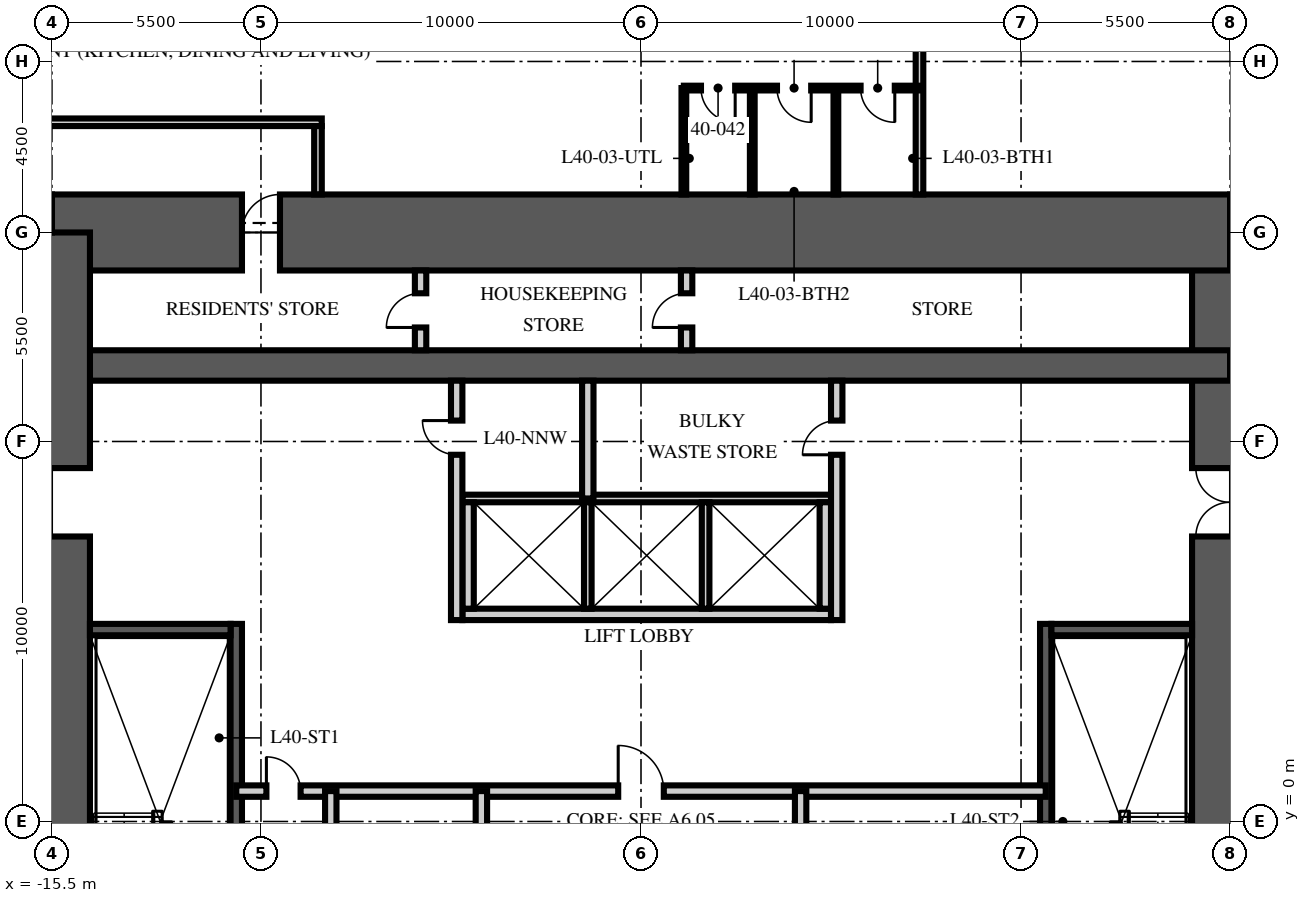
"""IFC4 building model, lengths in metres.
Left out: names, types, materials, properties, quantities, classifications, styles, units other than length and angle.
Written with IfcOpenShell. Run it as: python <this file> out.ifc"""

import sys

from ifc_helpers import new_model, si_unit, direction, frame, frame_2d, origin, place, context, subcontext, project, spatial, rectangle, extrude, element, fill, save


model = new_model("IFC4")
c1 = context("Model", 3, precision=1e-05, world=origin(), true_north=direction((0.0, 1.0)))
c2 = subcontext(c1, "Body", "Model", "MODEL_VIEW")
j1 = project(units=[si_unit("LENGTHUNIT", "METRE"), si_unit("PLANEANGLEUNIT", "RADIAN")], contexts=[c1])
p1 = place(None, origin())
s1 = spatial("IfcSite", under=j1, at=p1, CompositionType="ELEMENT")
p2 = place(p1, origin())
s2 = spatial("IfcBuilding", under=s1, at=p2, CompositionType="ELEMENT")
p3 = place(p2, frame((0.0, 0.0, 159.75)))
s3 = spatial("IfcBuildingStorey", under=s2, at=p3, CompositionType="ELEMENT", Elevation=159.75)
p4 = place(p3, frame((15.5, -15.5, -0.25), z_axis=(0.0, 0.0, 1.0), x_axis=(0.0, 1.0, 0.0)))
e1 = element("IfcWall", 1, at=p4, inside=s3, PredefinedType="SHEAR", context=c2, shape_type="SweptSolid", body=[
    extrude(rectangle(XDim=31.0, YDim=2.0, at=frame_2d((15.5, 0.0))), origin(), (0.0, 0.0, 1.0), 3.75),
])
p5 = place(p4, frame((6.5, 0.0, 0.25)))
e2 = element("IfcOpeningElement", 2, at=p5, cuts=e1, PredefinedType="OPENING", context=c2, shape_type="SweptSolid", body=[
    extrude(rectangle(XDim=1.2, YDim=2.1, at=frame_2d((0.6, 1.05))), frame((0.0, 1.01, 0.0), z_axis=(0.0, -1.0, 0.0), x_axis=(1.0, 0.0, 0.0)), (0.0, 0.0, 1.0), 2.02),
])
p6 = place(p4, frame((23.0, 0.0, 0.25)))
e3 = element("IfcOpeningElement", 3, at=p6, cuts=e1, PredefinedType="OPENING", context=c2, shape_type="SweptSolid", body=[
    extrude(rectangle(XDim=1.8, YDim=2.1, at=frame_2d((0.9, 1.05))), frame((0.0, 1.01, 0.0), z_axis=(0.0, -1.0, 0.0), x_axis=(1.0, 0.0, 0.0)), (0.0, 0.0, 1.0), 2.02),
])
p7 = place(p3, frame((-15.5, 15.5, -0.25), z_axis=(0.0, 0.0, 1.0), x_axis=(1.0, 0.0, 0.0)))
e4 = element("IfcWall", 4, at=p7, inside=s3, PredefinedType="SHEAR", context=c2, shape_type="SweptSolid", body=[
    extrude(rectangle(XDim=31.0, YDim=2.0, at=frame_2d((15.5, 0.0))), origin(), (0.0, 0.0, 1.0), 3.75),
])
p8 = place(p7, frame((5.0, 0.0, 0.25)))
e5 = element("IfcOpeningElement", 5, at=p8, cuts=e4, PredefinedType="OPENING", context=c2, shape_type="SweptSolid", body=[
    extrude(rectangle(XDim=1.0, YDim=2.1, at=frame_2d((0.5, 1.05))), frame((0.0, 1.01, 0.0), z_axis=(0.0, -1.0, 0.0), x_axis=(1.0, 0.0, 0.0)), (0.0, 0.0, 1.0), 2.02),
])
p9 = place(p3, frame((-15.5, 12.0, -0.25), z_axis=(0.0, 0.0, 1.0), x_axis=(1.0, 0.0, 0.0)))
e6 = element("IfcWall", 6, at=p9, inside=s3, PredefinedType="SHEAR", context=c2, shape_type="SweptSolid", body=[
    extrude(rectangle(XDim=31.0, YDim=0.8, at=frame_2d((15.5, 0.0))), origin(), (0.0, 0.0, 1.0), 3.75),
])
p10 = place(p3, frame((-15.5, -15.5, -0.25), z_axis=(0.0, 0.0, 1.0), x_axis=(0.0, 1.0, 0.0)))
e7 = element("IfcWall", 7, at=p10, inside=s3, PredefinedType="SHEAR", context=c2, shape_type="SweptSolid", body=[
    extrude(rectangle(XDim=31.0, YDim=2.0, at=frame_2d((15.5, 0.0))), origin(), (0.0, 0.0, 1.0), 3.75),
])
p11 = place(p10, frame((6.5, 0.0, 0.25)))
e8 = element("IfcOpeningElement", 8, at=p11, cuts=e7, PredefinedType="OPENING", context=c2, shape_type="SweptSolid", body=[
    extrude(rectangle(XDim=1.2, YDim=2.1, at=frame_2d((0.6, 1.05))), frame((0.0, 1.01, 0.0), z_axis=(0.0, -1.0, 0.0), x_axis=(1.0, 0.0, 0.0)), (0.0, 0.0, 1.0), 2.02),
])
p12 = place(p10, frame((23.0, 0.0, 0.25)))
e9 = element("IfcOpeningElement", 9, at=p12, cuts=e7, PredefinedType="OPENING", context=c2, shape_type="SweptSolid", body=[
    extrude(rectangle(XDim=1.8, YDim=2.1, at=frame_2d((0.9, 1.05))), frame((0.0, 1.01, 0.0), z_axis=(0.0, -1.0, 0.0), x_axis=(1.0, 0.0, 0.0)), (0.0, 0.0, 1.0), 2.02),
])
p13 = place(p3, frame((-10.65, -4.9, 0.0), z_axis=(0.0, 0.0, 1.0), x_axis=(0.0, 1.0, 0.0)))
e10 = element("IfcWall", 10, at=p13, inside=s3, PredefinedType="SOLIDWALL", context=c2, shape_type="SweptSolid", body=[
    extrude(rectangle(XDim=10.1, YDim=0.3, at=frame_2d((5.05, 0.0))), origin(), (0.0, 0.0, 1.0), 3.5),
])
p14 = place(p3, frame((-14.5, 5.05, 0.0), z_axis=(0.0, 0.0, 1.0), x_axis=(1.0, 0.0, 0.0)))
e11 = element("IfcWall", 11, at=p14, inside=s3, PredefinedType="SOLIDWALL", context=c2, shape_type="SweptSolid", body=[
    extrude(rectangle(XDim=3.7, YDim=0.3, at=frame_2d((1.85, 0.0))), origin(), (0.0, 0.0, 1.0), 3.5),
])
p15 = place(p3, frame((10.65, -4.9, 0.0), z_axis=(0.0, 0.0, 1.0), x_axis=(0.0, 1.0, 0.0)))
e12 = element("IfcWall", 12, at=p15, inside=s3, PredefinedType="SOLIDWALL", context=c2, shape_type="SweptSolid", body=[
    extrude(rectangle(XDim=10.1, YDim=0.3, at=frame_2d((5.05, 0.0))), origin(), (0.0, 0.0, 1.0), 3.5),
])
p16 = place(p3, frame((14.5, 5.05, 0.0), z_axis=(0.0, 0.0, 1.0), x_axis=(-1.0, 0.0, 0.0)))
e13 = element("IfcWall", 13, at=p16, inside=s3, PredefinedType="SOLIDWALL", context=c2, shape_type="SweptSolid", body=[
    extrude(rectangle(XDim=3.7, YDim=0.3, at=frame_2d((1.85, 0.0))), origin(), (0.0, 0.0, 1.0), 3.5),
])
p17 = place(p3, frame((-4.7, 5.45, 0.0), z_axis=(0.0, 0.0, 1.0), x_axis=(1.0, 0.0, 0.0)))
e14 = element("IfcWall", 14, at=p17, inside=s3, PredefinedType="PARTITIONING", context=c2, shape_type="SweptSolid", body=[
    extrude(rectangle(XDim=9.7, YDim=0.3, at=frame_2d((4.85, 0.0))), origin(), (0.0, 0.0, 1.0), 3.5),
])
p18 = place(p3, frame((-4.7, 8.5, 0.0), z_axis=(0.0, 0.0, 1.0), x_axis=(1.0, 0.0, 0.0)))
e15 = element("IfcWall", 15, at=p18, inside=s3, PredefinedType="PARTITIONING", context=c2, shape_type="SweptSolid", body=[
    extrude(rectangle(XDim=9.7, YDim=0.2, at=frame_2d((4.85, 0.0))), origin(), (0.0, 0.0, 1.0), 3.5),
])
for number, where, z_axis, x_axis in (
    (16, (-4.55, 5.6, 0.0), (0.0, 0.0, 1.0), (0.0, 1.0, 0.0)),
    (17, (4.85, 5.6, 0.0), (0.0, 0.0, 1.0), (0.0, 1.0, 0.0)),
):
    element("IfcWall", number, at=place(p3, frame(where, z_axis=z_axis, x_axis=x_axis)), inside=s3, PredefinedType="PARTITIONING", context=c2, shape_type="SweptSolid", body=[
        extrude(rectangle(XDim=2.8, YDim=0.3, at=frame_2d((1.4, 0.0))), origin(), (0.0, 0.0, 1.0), 3.5),
    ])
for number, where, z_axis, x_axis in (
    (18, (-1.4, 5.6, 0.0), (0.0, 0.0, 1.0), (0.0, 1.0, 0.0)),
    (19, (1.7, 5.6, 0.0), (0.0, 0.0, 1.0), (0.0, 1.0, 0.0)),
):
    element("IfcWall", number, at=place(p3, frame(where, z_axis=z_axis, x_axis=x_axis)), inside=s3, PredefinedType="PARTITIONING", context=c2, shape_type="SweptSolid", body=[
        extrude(rectangle(XDim=2.8, YDim=0.2, at=frame_2d((1.4, 0.0))), origin(), (0.0, 0.0, 1.0), 3.5),
    ])
p19 = place(p3, frame((-10.65, 0.8, 0.0), z_axis=(0.0, 0.0, 1.0), x_axis=(1.0, 0.0, 0.0)))
e20 = element("IfcWall", 20, at=p19, inside=s3, PredefinedType="PARTITIONING", context=c2, shape_type="SweptSolid", body=[
    extrude(rectangle(XDim=21.3, YDim=0.3, at=frame_2d((10.65, 0.0))), origin(), (0.0, 0.0, 1.0), 3.5),
])
p20 = place(p19, frame((10.05, 0.0, 0.0)))
e21 = element("IfcOpeningElement", 21, at=p20, cuts=e20, PredefinedType="OPENING", context=c2, shape_type="SweptSolid", body=[
    extrude(rectangle(XDim=1.2, YDim=2.1, at=frame_2d((0.6, 1.05))), frame((0.0, 0.16, 0.0), z_axis=(0.0, -1.0, 0.0), x_axis=(1.0, 0.0, 0.0)), (0.0, 0.0, 1.0), 0.32),
])
p21 = place(p19, frame((0.793, 0.0, 0.0)))
e22 = element("IfcOpeningElement", 22, at=p21, cuts=e20, PredefinedType="OPENING", context=c2, shape_type="SweptSolid", body=[
    extrude(rectangle(XDim=0.9, YDim=2.1, at=frame_2d((0.45, 1.05))), frame((0.0, 0.16, 0.0), z_axis=(0.0, -1.0, 0.0), x_axis=(1.0, 0.0, 0.0)), (0.0, 0.0, 1.0), 0.32),
])
p22 = place(p3, frame((-4.2, -6.65, 0.0), z_axis=(0.0, 0.0, 1.0), x_axis=(0.0, 1.0, 0.0)))
e23 = element("IfcWall", 23, at=p22, inside=s3, PredefinedType="PARTITIONING", context=c2, shape_type="SweptSolid", body=[
    extrude(rectangle(XDim=7.45, YDim=0.3, at=frame_2d((3.725, 0.0))), origin(), (0.0, 0.0, 1.0), 3.5),
])
p23 = place(p22, frame((3.275, 0.0, 0.0)))
e24 = element("IfcOpeningElement", 24, at=p23, cuts=e23, PredefinedType="OPENING", context=c2, shape_type="SweptSolid", body=[
    extrude(rectangle(XDim=0.9, YDim=2.1, at=frame_2d((0.45, 1.05))), frame((0.0, 0.16, 0.0), z_axis=(0.0, -1.0, 0.0), x_axis=(1.0, 0.0, 0.0)), (0.0, 0.0, 1.0), 0.32),
])
p24 = place(p3, frame((4.2, -6.65, 0.0), z_axis=(0.0, 0.0, 1.0), x_axis=(0.0, 1.0, 0.0)))
e25 = element("IfcWall", 25, at=p24, inside=s3, PredefinedType="PARTITIONING", context=c2, shape_type="SweptSolid", body=[
    extrude(rectangle(XDim=7.45, YDim=0.3, at=frame_2d((3.725, 0.0))), origin(), (0.0, 0.0, 1.0), 3.5),
])
p25 = place(p24, frame((0.866, 0.0, 0.0)))
e26 = element("IfcOpeningElement", 26, at=p25, cuts=e25, PredefinedType="OPENING", context=c2, shape_type="SweptSolid", body=[
    extrude(rectangle(XDim=0.9, YDim=2.1, at=frame_2d((0.45, 1.05))), frame((0.0, 0.16, 0.0), z_axis=(0.0, -1.0, 0.0), x_axis=(1.0, 0.0, 0.0)), (0.0, 0.0, 1.0), 0.32),
])
p26 = place(p24, frame((4.591, 0.0, 0.0)))
e27 = element("IfcOpeningElement", 27, at=p26, cuts=e25, PredefinedType="OPENING", context=c2, shape_type="SweptSolid", body=[
    extrude(rectangle(XDim=0.9, YDim=2.1, at=frame_2d((0.45, 1.05))), frame((0.0, 0.16, 0.0), z_axis=(0.0, -1.0, 0.0), x_axis=(1.0, 0.0, 0.0)), (0.0, 0.0, 1.0), 0.32),
])
p27 = place(p3, frame((-8.163, -6.65, 0.0), z_axis=(0.0, 0.0, 1.0), x_axis=(0.0, 1.0, 0.0)))
e28 = element("IfcWall", 28, at=p27, inside=s3, PredefinedType="PARTITIONING", context=c2, shape_type="SweptSolid", body=[
    extrude(rectangle(XDim=7.45, YDim=0.3, at=frame_2d((3.725, 0.0))), origin(), (0.0, 0.0, 1.0), 3.5),
])
p28 = place(p3, frame((-4.85, 5.3, 0.0), z_axis=(0.0, 0.0, 1.0), x_axis=(0.0, 1.0, 0.0)))
e29 = element("IfcWall", 29, at=p28, inside=s3, PredefinedType="PARTITIONING", context=c2, shape_type="SweptSolid", body=[
    extrude(rectangle(XDim=6.3, YDim=0.3, at=frame_2d((3.15, 0.0))), origin(), (0.0, 0.0, 1.0), 3.5),
])
p29 = place(p28, frame((4.35, 0.0, 0.0)))
e30 = element("IfcOpeningElement", 30, at=p29, cuts=e29, PredefinedType="OPENING", context=c2, shape_type="SweptSolid", body=[
    extrude(rectangle(XDim=0.9, YDim=2.1, at=frame_2d((0.45, 1.05))), frame((0.0, 0.16, 0.0), z_axis=(0.0, -1.0, 0.0), x_axis=(1.0, 0.0, 0.0)), (0.0, 0.0, 1.0), 0.32),
])
p30 = place(p3, frame((5.15, 5.3, 0.0), z_axis=(0.0, 0.0, 1.0), x_axis=(0.0, 1.0, 0.0)))
e31 = element("IfcWall", 31, at=p30, inside=s3, PredefinedType="PARTITIONING", context=c2, shape_type="SweptSolid", body=[
    extrude(rectangle(XDim=6.3, YDim=0.3, at=frame_2d((3.15, 0.0))), origin(), (0.0, 0.0, 1.0), 3.5),
])
p31 = place(p30, frame((4.35, 0.0, 0.0)))
e32 = element("IfcOpeningElement", 32, at=p31, cuts=e31, PredefinedType="OPENING", context=c2, shape_type="SweptSolid", body=[
    extrude(rectangle(XDim=0.9, YDim=2.1, at=frame_2d((0.45, 1.05))), frame((0.0, 0.16, 0.0), z_axis=(0.0, -1.0, 0.0), x_axis=(1.0, 0.0, 0.0)), (0.0, 0.0, 1.0), 0.32),
])
p32 = place(p3, frame((-1.4, 8.5, 0.0), z_axis=(0.0, 0.0, 1.0), x_axis=(0.0, 1.0, 0.0)))
e33 = element("IfcWall", 33, at=p32, inside=s3, PredefinedType="PARTITIONING", context=c2, shape_type="SweptSolid", body=[
    extrude(rectangle(XDim=3.1, YDim=0.3, at=frame_2d((1.55, 0.0))), origin(), (0.0, 0.0, 1.0), 3.5),
])
p33 = place(p3, frame((-5.8, 12.4, 0.0), z_axis=(0.0, 0.0, 1.0), x_axis=(0.0, 1.0, 0.0)))
e34 = element("IfcWall", 34, at=p33, inside=s3, PredefinedType="PARTITIONING", context=c2, shape_type="SweptSolid", body=[
    extrude(rectangle(XDim=2.1, YDim=0.3, at=frame_2d((1.05, 0.0))), origin(), (0.0, 0.0, 1.0), 3.5),
])
p34 = place(p33, frame((0.6, 0.0, 0.0)))
e35 = element("IfcOpeningElement", 35, at=p34, cuts=e34, PredefinedType="OPENING", context=c2, shape_type="SweptSolid", body=[
    extrude(rectangle(XDim=0.9, YDim=2.1, at=frame_2d((0.45, 1.05))), frame((0.0, 0.16, 0.0), z_axis=(0.0, -1.0, 0.0), x_axis=(1.0, 0.0, 0.0)), (0.0, 0.0, 1.0), 0.32),
])
p35 = place(p3, frame((1.2, 12.4, 0.0), z_axis=(0.0, 0.0, 1.0), x_axis=(0.0, 1.0, 0.0)))
e36 = element("IfcWall", 36, at=p35, inside=s3, PredefinedType="PARTITIONING", context=c2, shape_type="SweptSolid", body=[
    extrude(rectangle(XDim=2.1, YDim=0.3, at=frame_2d((1.05, 0.0))), origin(), (0.0, 0.0, 1.0), 3.5),
])
p36 = place(p35, frame((0.6, 0.0, 0.0)))
e37 = element("IfcOpeningElement", 37, at=p36, cuts=e36, PredefinedType="OPENING", context=c2, shape_type="SweptSolid", body=[
    extrude(rectangle(XDim=0.9, YDim=2.1, at=frame_2d((0.45, 1.05))), frame((0.0, 0.16, 0.0), z_axis=(0.0, -1.0, 0.0), x_axis=(1.0, 0.0, 0.0)), (0.0, 0.0, 1.0), 0.32),
])
p37 = place(p3, frame((-18.5, 18.4, 0.0), z_axis=(0.0, 0.0, 1.0), x_axis=(1.0, 0.0, 0.0)))
e38 = element("IfcWall", 38, at=p37, inside=s3, PredefinedType="PARTITIONING", context=c2, shape_type="SweptSolid", body=[
    extrude(rectangle(XDim=10.1, YDim=0.2, at=frame_2d((5.05, 0.0))), origin(), (0.0, 0.0, 1.0), 2.3),
])
p38 = place(p3, frame((-8.5, 18.3, 0.0), z_axis=(0.0, 0.0, 1.0), x_axis=(0.0, -1.0, 0.0)))
e39 = element("IfcWall", 39, at=p38, inside=s3, PredefinedType="PARTITIONING", context=c2, shape_type="SweptSolid", body=[
    extrude(rectangle(XDim=1.8, YDim=0.2, at=frame_2d((0.9, 0.0))), origin(), (0.0, 0.0, 1.0), 3.5),
])
p39 = place(p3, frame((7.328, 16.5, 0.0), z_axis=(0.0, 0.0, 1.0), x_axis=(0.0, 1.0, 0.0)))
e40 = element("IfcWall", 40, at=p39, inside=s3, PredefinedType="PARTITIONING", context=c2, shape_type="SweptSolid", body=[
    extrude(rectangle(XDim=11.9, YDim=0.2, at=frame_2d((5.95, 0.0))), origin(), (0.0, 0.0, 1.0), 2.81),
])
p40 = place(p3, frame((7.328, 19.3, 0.0), z_axis=(0.0, 0.0, 1.0), x_axis=(-1.0, 0.0, 0.0)))
e41 = element("IfcWall", 41, at=p40, inside=s3, PredefinedType="PARTITIONING", context=c2, shape_type="SweptSolid", body=[
    extrude(rectangle(XDim=6.2, YDim=0.125, at=frame_2d((3.1, 0.0))), origin(), (0.0, 0.0, 1.0), 2.81),
])
p41 = place(p40, frame((0.65, 0.0, 0.0)))
e42 = element("IfcOpeningElement", 42, at=p41, cuts=e41, PredefinedType="OPENING", context=c2, shape_type="SweptSolid", body=[
    extrude(rectangle(XDim=0.9, YDim=2.1, at=frame_2d((0.45, 1.05))), frame((0.0, 0.073, 0.0), z_axis=(0.0, -1.0, 0.0), x_axis=(1.0, 0.0, 0.0)), (0.0, 0.0, 1.0), 0.145),
])
p42 = place(p40, frame((2.85, 0.0, 0.0)))
e43 = element("IfcOpeningElement", 43, at=p42, cuts=e41, PredefinedType="OPENING", context=c2, shape_type="SweptSolid", body=[
    extrude(rectangle(XDim=0.9, YDim=2.1, at=frame_2d((0.45, 1.05))), frame((0.0, 0.073, 0.0), z_axis=(0.0, -1.0, 0.0), x_axis=(1.0, 0.0, 0.0)), (0.0, 0.0, 1.0), 0.145),
])
p43 = place(p40, frame((4.85, 0.0, 0.0)))
e44 = element("IfcOpeningElement", 44, at=p43, cuts=e41, PredefinedType="OPENING", context=c2, shape_type="SweptSolid", body=[
    extrude(rectangle(XDim=0.9, YDim=2.1, at=frame_2d((0.45, 1.05))), frame((0.0, 0.073, 0.0), z_axis=(0.0, -1.0, 0.0), x_axis=(1.0, 0.0, 0.0)), (0.0, 0.0, 1.0), 0.145),
])
for number, where, z_axis, x_axis in (
    (45, (5.128, 16.5, 0.0), (0.0, 0.0, 1.0), (0.0, 1.0, 0.0)),
    (46, (2.928, 16.5, 0.0), (0.0, 0.0, 1.0), (0.0, 1.0, 0.0)),
    (47, (1.128, 16.5, 0.0), (0.0, 0.0, 1.0), (0.0, 1.0, 0.0)),
):
    element("IfcWall", number, at=place(p3, frame(where, z_axis=z_axis, x_axis=x_axis)), inside=s3, PredefinedType="PARTITIONING", context=c2, shape_type="SweptSolid", body=[
        extrude(rectangle(XDim=2.8, YDim=0.125, at=frame_2d((1.4, 0.0))), origin(), (0.0, 0.0, 1.0), 3.5),
    ])
p44 = place(p12, origin())
e48 = element("IfcDoor", 48, at=p44, inside=s3, OperationType="DOUBLE_DOOR_SINGLE_SWING", PredefinedType="DOOR", context=c2, shape_type="SweptSolid", body=[
    extrude(rectangle(XDim=1.8, YDim=2.1, at=frame_2d((0.9, 1.05))), frame((0.0, 0.025, 0.0), z_axis=(0.0, -1.0, 0.0), x_axis=(1.0, 0.0, 0.0)), (0.0, 0.0, 1.0), 0.05),
])
fill(e9, e48)
p45 = place(p6, origin())
e49 = element("IfcDoor", 49, at=p45, inside=s3, OperationType="DOUBLE_DOOR_SINGLE_SWING", PredefinedType="DOOR", context=c2, shape_type="SweptSolid", body=[
    extrude(rectangle(XDim=1.8, YDim=2.1, at=frame_2d((0.9, 1.05))), frame((0.0, 0.025, 0.0), z_axis=(0.0, -1.0, 0.0), x_axis=(1.0, 0.0, 0.0)), (0.0, 0.0, 1.0), 0.05),
])
fill(e3, e49)
p46 = place(p20, origin())
e50 = element("IfcDoor", 50, at=p46, inside=s3, OperationType="SINGLE_SWING_LEFT", PredefinedType="DOOR", context=c2, shape_type="SweptSolid", body=[
    extrude(rectangle(XDim=1.2, YDim=2.1, at=frame_2d((0.6, 1.05))), frame((0.0, 0.025, 0.0), z_axis=(0.0, -1.0, 0.0), x_axis=(1.0, 0.0, 0.0)), (0.0, 0.0, 1.0), 0.05),
])
fill(e21, e50)
p47 = place(p21, origin())
e51 = element("IfcDoor", 51, at=p47, inside=s3, OperationType="SINGLE_SWING_LEFT", PredefinedType="DOOR", context=c2, shape_type="SweptSolid", body=[
    extrude(rectangle(XDim=0.9, YDim=2.1, at=frame_2d((0.45, 1.05))), frame((0.0, 0.025, 0.0), z_axis=(0.0, -1.0, 0.0), x_axis=(1.0, 0.0, 0.0)), (0.0, 0.0, 1.0), 0.05),
])
fill(e22, e51)
p48 = place(p29, origin())
e52 = element("IfcDoor", 52, at=p48, inside=s3, OperationType="SINGLE_SWING_RIGHT", PredefinedType="DOOR", context=c2, shape_type="SweptSolid", body=[
    extrude(rectangle(XDim=0.9, YDim=2.1, at=frame_2d((0.45, 1.05))), frame((0.0, 0.025, 0.0), z_axis=(0.0, -1.0, 0.0), x_axis=(1.0, 0.0, 0.0)), (0.0, 0.0, 1.0), 0.05),
])
fill(e30, e52)
p49 = place(p31, origin())
e53 = element("IfcDoor", 53, at=p49, inside=s3, OperationType="SINGLE_SWING_LEFT", PredefinedType="DOOR", context=c2, shape_type="SweptSolid", body=[
    extrude(rectangle(XDim=0.9, YDim=2.1, at=frame_2d((0.45, 1.05))), frame((0.0, 0.025, 0.0), z_axis=(0.0, -1.0, 0.0), x_axis=(1.0, 0.0, 0.0)), (0.0, 0.0, 1.0), 0.05),
])
fill(e32, e53)
p50 = place(p34, origin())
e54 = element("IfcDoor", 54, at=p50, inside=s3, OperationType="SINGLE_SWING_LEFT", PredefinedType="DOOR", context=c2, shape_type="SweptSolid", body=[
    extrude(rectangle(XDim=0.9, YDim=2.1, at=frame_2d((0.45, 1.05))), frame((0.0, 0.025, 0.0), z_axis=(0.0, -1.0, 0.0), x_axis=(1.0, 0.0, 0.0)), (0.0, 0.0, 1.0), 0.05),
])
fill(e35, e54)
p51 = place(p36, origin())
e55 = element("IfcDoor", 55, at=p51, inside=s3, OperationType="SINGLE_SWING_LEFT", PredefinedType="DOOR", context=c2, shape_type="SweptSolid", body=[
    extrude(rectangle(XDim=0.9, YDim=2.1, at=frame_2d((0.45, 1.05))), frame((0.0, 0.025, 0.0), z_axis=(0.0, -1.0, 0.0), x_axis=(1.0, 0.0, 0.0)), (0.0, 0.0, 1.0), 0.05),
])
fill(e37, e55)
p52 = place(p8, origin())
e56 = element("IfcDoor", 56, at=p52, inside=s3, OperationType="SINGLE_SWING_RIGHT", PredefinedType="DOOR", context=c2, shape_type="SweptSolid", body=[
    extrude(rectangle(XDim=1.0, YDim=2.1, at=frame_2d((0.5, 1.05))), frame((0.0, 0.025, 0.0), z_axis=(0.0, -1.0, 0.0), x_axis=(1.0, 0.0, 0.0)), (0.0, 0.0, 1.0), 0.05),
])
fill(e5, e56)
p53 = place(p41, origin())
e57 = element("IfcDoor", 57, at=p53, inside=s3, OperationType="SINGLE_SWING_LEFT", PredefinedType="DOOR", context=c2, shape_type="SweptSolid", body=[
    extrude(rectangle(XDim=0.9, YDim=2.1, at=frame_2d((0.45, 1.05))), frame((0.0, 0.025, 0.0), z_axis=(0.0, -1.0, 0.0), x_axis=(1.0, 0.0, 0.0)), (0.0, 0.0, 1.0), 0.05),
])
fill(e42, e57)
p54 = place(p42, origin())
e58 = element("IfcDoor", 58, at=p54, inside=s3, OperationType="SINGLE_SWING_LEFT", PredefinedType="DOOR", context=c2, shape_type="SweptSolid", body=[
    extrude(rectangle(XDim=0.9, YDim=2.1, at=frame_2d((0.45, 1.05))), frame((0.0, 0.025, 0.0), z_axis=(0.0, -1.0, 0.0), x_axis=(1.0, 0.0, 0.0)), (0.0, 0.0, 1.0), 0.05),
])
fill(e43, e58)
p55 = place(p43, origin())
e59 = element("IfcDoor", 59, at=p55, inside=s3, OperationType="SINGLE_SWING_LEFT", PredefinedType="DOOR", context=c2, shape_type="SweptSolid", body=[
    extrude(rectangle(XDim=0.9, YDim=2.1, at=frame_2d((0.45, 1.05))), frame((0.0, 0.025, 0.0), z_axis=(0.0, -1.0, 0.0), x_axis=(1.0, 0.0, 0.0)), (0.0, 0.0, 1.0), 0.05),
])
fill(e44, e59)
save(model, sys.argv[1])
